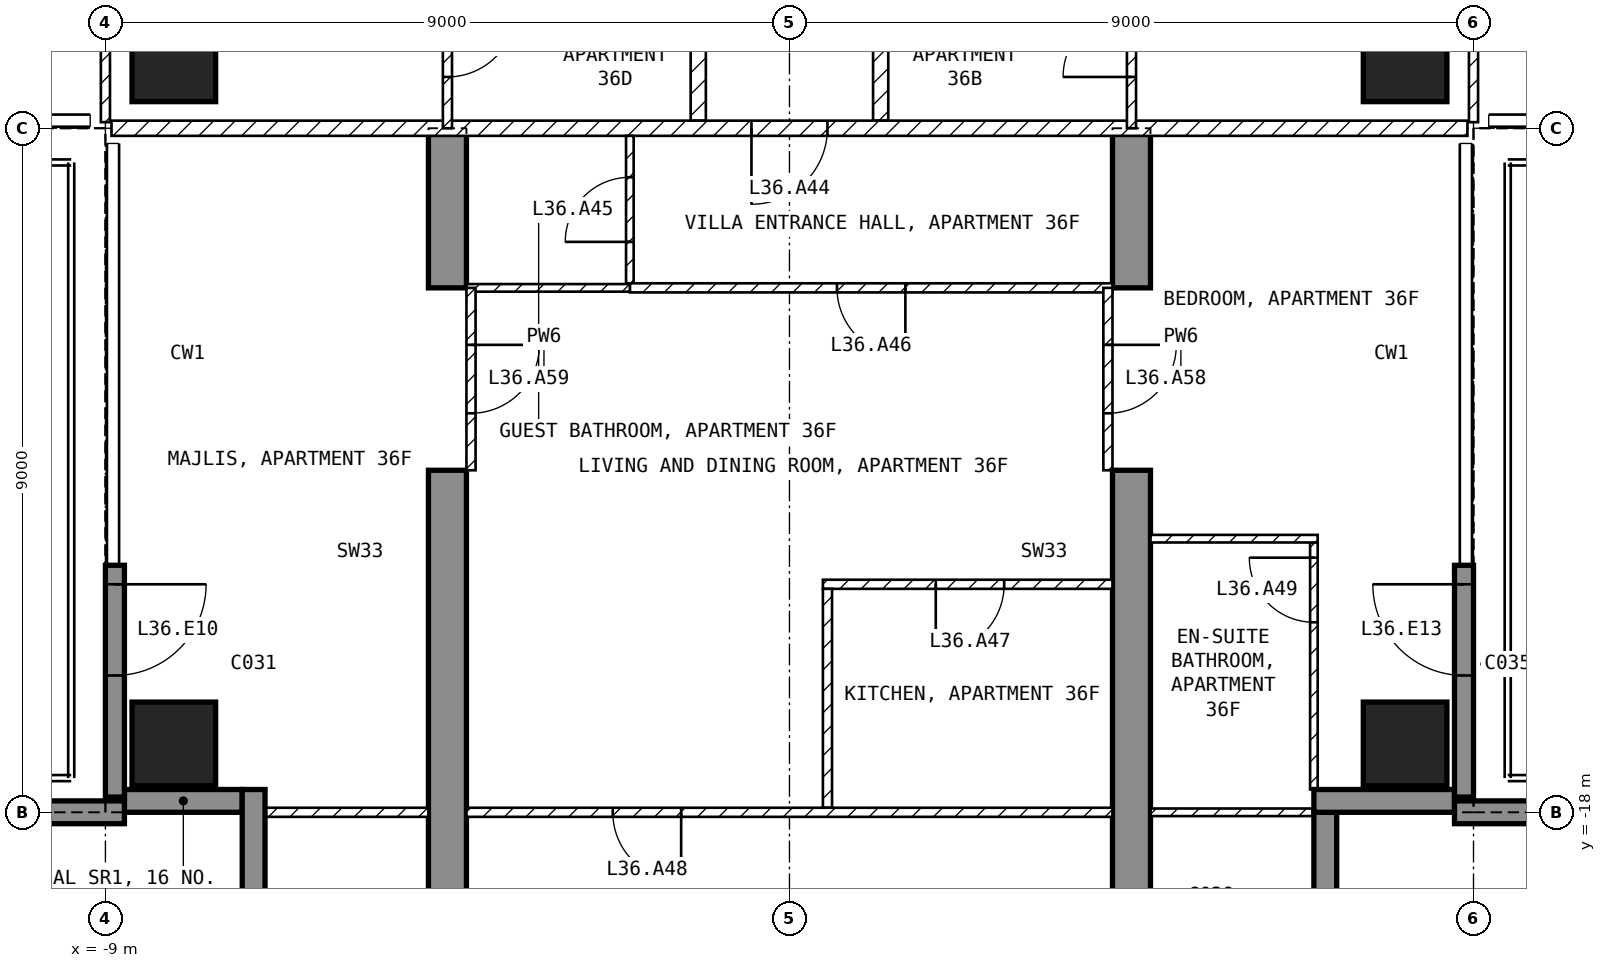
"""IFC4 building model, lengths in metres.
Left out: names, types, materials, properties, quantities, classifications, styles, units other than length and angle.
Written with IfcOpenShell. Run it as: python <this file> out.ifc"""

import sys

from ifc_helpers import new_model, si_unit, direction, frame, frame_2d, origin, origin_2d, place, context, subcontext, project, spatial, polyline, rectangle, outline, extrude, element, fill, save


model = new_model("IFC4")
c1 = context("Model", 3, precision=1e-05, world=origin(), true_north=direction((0.0, 1.0)))
c2 = subcontext(c1, "Body", "Model", "MODEL_VIEW")
j1 = project(units=[si_unit("LENGTHUNIT", "METRE"), si_unit("PLANEANGLEUNIT", "RADIAN")], contexts=[c1])
p1 = place(None, origin())
s1 = spatial("IfcSite", under=j1, at=p1, CompositionType="ELEMENT")
p2 = place(p1, origin())
s2 = spatial("IfcBuilding", under=s1, at=p2, CompositionType="ELEMENT")
p3 = place(p2, frame((0.0, 0.0, 147.9)))
s3 = spatial("IfcBuildingStorey", under=s2, at=p3, CompositionType="ELEMENT", Elevation=147.9)
for number, where, z_axis, x_axis in (
    (1, (-8.1, -17.1, -0.25), (0.0, 0.0, 1.0), (1.0, 0.0, 0.0)),
    (2, (-8.1, -8.1, -0.25), (0.0, 0.0, 1.0), (1.0, 0.0, 0.0)),
    (3, (8.1, -17.1, -0.25), (0.0, 0.0, 1.0), (1.0, 0.0, 0.0)),
    (4, (8.1, -8.1, -0.25), (0.0, 0.0, 1.0), (1.0, 0.0, 0.0)),
):
    element("IfcColumn", number, at=place(p3, frame(where, z_axis=z_axis, x_axis=x_axis)), inside=s3, PredefinedType="COLUMN", context=c2, shape_type="SweptSolid", body=[
        extrude(rectangle(XDim=1.1, YDim=1.1, at=origin_2d()), origin(), (0.0, 0.0, 1.0), 3.5),
    ])
for number, where, z_axis, x_axis in (
    (5, (-4.75, -20.15, -0.25), (1.0, 0.0, 0.0), (0.0, 1.0, 0.0)),
    (6, (4.25, -20.15, -0.25), (1.0, 0.0, 0.0), (0.0, 1.0, 0.0)),
):
    element("IfcWall", number, at=place(p3, frame(where, z_axis=z_axis, x_axis=x_axis)), inside=s3, PredefinedType="SHEAR", context=c2, shape_type="SweptSolid", body=[
        extrude(outline(polyline([(0.0, 0.0), (6.65, 0.0), (6.65, 2.65), (9.05, 2.65), (9.05, 0.0), (11.15, 0.0), (11.15, 3.5), (0.0, 3.5), (0.0, 0.0)])), origin(), (0.0, 0.0, 1.0), 0.5),
    ])
p4 = place(p3, frame((-8.875, -14.75, 0.0), z_axis=(0.0, 0.0, 1.0), x_axis=(0.0, -1.0, 0.0)))
e7 = element("IfcWall", 7, at=p4, inside=s3, PredefinedType="SOLIDWALL", context=c2, shape_type="SweptSolid", body=[
    extrude(rectangle(XDim=3.05, YDim=0.25, at=frame_2d((1.525, 0.0))), origin(), (0.0, 0.0, 1.0), 3.25),
])
p5 = place(p4, frame((0.25, 0.0, 0.0)))
e8 = element("IfcOpeningElement", 8, at=p5, cuts=e7, PredefinedType="OPENING", context=c2, shape_type="SweptSolid", body=[
    extrude(rectangle(XDim=1.2, YDim=2.4, at=frame_2d((0.6, 1.2))), frame((0.0, 0.135, 0.0), z_axis=(0.0, -1.0, 0.0), x_axis=(1.0, 0.0, 0.0)), (0.0, 0.0, 1.0), 0.27),
])
p6 = place(p3, frame((8.875, -17.8, 0.0), z_axis=(0.0, 0.0, 1.0), x_axis=(0.0, 1.0, 0.0)))
e9 = element("IfcWall", 9, at=p6, inside=s3, PredefinedType="SOLIDWALL", context=c2, shape_type="SweptSolid", body=[
    extrude(rectangle(XDim=3.05, YDim=0.25, at=frame_2d((1.525, 0.0))), origin(), (0.0, 0.0, 1.0), 3.25),
])
p7 = place(p6, frame((1.6, 0.0, 0.0)))
e10 = element("IfcOpeningElement", 10, at=p7, cuts=e9, PredefinedType="OPENING", context=c2, shape_type="SweptSolid", body=[
    extrude(rectangle(XDim=1.2, YDim=2.4, at=frame_2d((0.6, 1.2))), frame((0.0, 0.135, 0.0), z_axis=(0.0, -1.0, 0.0), x_axis=(1.0, 0.0, 0.0)), (0.0, 0.0, 1.0), 0.27),
])
p8 = place(p3, frame((7.05, -19.8, 0.0), z_axis=(0.0, 0.0, 1.0), x_axis=(0.0, 1.0, 0.0)))
e11 = element("IfcWall", 11, at=p8, inside=s3, PredefinedType="SOLIDWALL", context=c2, shape_type="SweptSolid", body=[
    extrude(rectangle(XDim=1.8, YDim=0.3, at=frame_2d((0.9, 0.0))), origin(), (0.0, 0.0, 1.0), 3.25),
])
p9 = place(p3, frame((6.9, -17.85, 0.0), z_axis=(0.0, 0.0, 1.0), x_axis=(1.0, 0.0, 0.0)))
e12 = element("IfcWall", 12, at=p9, inside=s3, PredefinedType="SOLIDWALL", context=c2, shape_type="SweptSolid", body=[
    extrude(rectangle(XDim=1.85, YDim=0.3, at=frame_2d((0.925, 0.0))), origin(), (0.0, 0.0, 1.0), 3.25),
])
p10 = place(p3, frame((-8.75, -17.85, 0.0), z_axis=(0.0, 0.0, 1.0), x_axis=(1.0, 0.0, 0.0)))
e13 = element("IfcWall", 13, at=p10, inside=s3, PredefinedType="SOLIDWALL", context=c2, shape_type="SweptSolid", body=[
    extrude(rectangle(XDim=1.55, YDim=0.3, at=frame_2d((0.775, 0.0))), origin(), (0.0, 0.0, 1.0), 3.25),
])
p11 = place(p3, frame((-7.05, -17.7, 0.0), z_axis=(0.0, 0.0, 1.0), x_axis=(0.0, -1.0, 0.0)))
e14 = element("IfcWall", 14, at=p11, inside=s3, PredefinedType="SOLIDWALL", context=c2, shape_type="SweptSolid", body=[
    extrude(rectangle(XDim=1.8, YDim=0.3, at=frame_2d((0.9, 0.0))), origin(), (0.0, 0.0, 1.0), 3.25),
])
for number, where, z_axis, x_axis in (
    (15, (-8.75, -18.0, 0.0), (0.0, 0.0, 1.0), (-1.0, 0.0, 0.0)),
    (16, (8.75, -18.0, 0.0), (0.0, 0.0, 1.0), (1.0, 0.0, 0.0)),
):
    element("IfcWall", number, at=place(p3, frame(where, z_axis=z_axis, x_axis=x_axis)), inside=s3, PredefinedType="SOLIDWALL", context=c2, shape_type="SweptSolid", body=[
        extrude(rectangle(XDim=2.99, YDim=0.3, at=frame_2d((1.495, 0.0))), origin(), (0.0, 0.0, 1.0), 3.25),
    ])
for number, where, z_axis, x_axis in (
    (17, (1.2, -4.6, 0.0), (0.0, 0.0, 1.0), (0.0, -1.0, 0.0)),
    (18, (-1.2, -8.9, 0.0), (0.0, 0.0, 1.0), (0.0, 1.0, 0.0)),
):
    element("IfcWall", number, at=place(p3, frame(where, z_axis=z_axis, x_axis=x_axis)), inside=s3, PredefinedType="PARTITIONING", context=c2, shape_type="SweptSolid", body=[
        extrude(rectangle(XDim=4.3, YDim=0.2, at=frame_2d((2.15, 0.0))), origin(), (0.0, 0.0, 1.0), 3.25),
    ])
p12 = place(p3, frame((8.92, -9.0, 0.0), z_axis=(0.0, 0.0, 1.0), x_axis=(-1.0, 0.0, 0.0)))
e19 = element("IfcWall", 19, at=p12, inside=s3, PredefinedType="PARTITIONING", context=c2, shape_type="SweptSolid", body=[
    extrude(rectangle(XDim=17.84, YDim=0.2, at=frame_2d((8.92, 0.0))), origin(), (0.0, 0.0, 1.0), 3.25),
])
p13 = place(p12, frame((8.42, 0.0, 0.0)))
e20 = element("IfcOpeningElement", 20, at=p13, cuts=e19, PredefinedType="OPENING", context=c2, shape_type="SweptSolid", body=[
    extrude(rectangle(XDim=1.0, YDim=2.1, at=frame_2d((0.5, 1.05))), frame((0.0, 0.11, 0.0), z_axis=(0.0, -1.0, 0.0), x_axis=(1.0, 0.0, 0.0)), (0.0, 0.0, 1.0), 0.22),
])
p14 = place(p3, frame((9.0, -8.92, 0.0), z_axis=(0.0, 0.0, 1.0), x_axis=(0.0, 1.0, 0.0)))
e21 = element("IfcWall", 21, at=p14, inside=s3, PredefinedType="PARTITIONING", context=c2, shape_type="SweptSolid", body=[
    extrude(rectangle(XDim=7.62, YDim=0.12, at=frame_2d((3.81, 0.0))), origin(), (0.0, 0.0, 1.0), 3.25),
])
p15 = place(p14, frame((2.52, 0.0, 0.0)))
e22 = element("IfcOpeningElement", 22, at=p15, cuts=e21, PredefinedType="OPENING", context=c2, shape_type="SweptSolid", body=[
    extrude(rectangle(XDim=0.9, YDim=2.1, at=frame_2d((0.45, 1.05))), frame((0.0, 0.07, 0.0), z_axis=(0.0, -1.0, 0.0), x_axis=(1.0, 0.0, 0.0)), (0.0, 0.0, 1.0), 0.14),
])
p16 = place(p3, frame((4.5, -9.0, 0.0), z_axis=(0.0, 0.0, 1.0), x_axis=(0.0, 1.0, 0.0)))
e23 = element("IfcWall", 23, at=p16, inside=s3, PredefinedType="PARTITIONING", context=c2, shape_type="SweptSolid", body=[
    extrude(rectangle(XDim=2.25, YDim=0.12, at=frame_2d((1.125, 0.0))), origin(), (0.0, 0.0, 1.0), 3.25),
])
p17 = place(p16, frame((0.675, 0.0, 0.0)))
e24 = element("IfcOpeningElement", 24, at=p17, cuts=e23, PredefinedType="OPENING", context=c2, shape_type="SweptSolid", body=[
    extrude(rectangle(XDim=0.9, YDim=2.1, at=frame_2d((0.45, 1.05))), frame((0.0, 0.07, 0.0), z_axis=(0.0, -1.0, 0.0), x_axis=(1.0, 0.0, 0.0)), (0.0, 0.0, 1.0), 0.14),
])
p18 = place(p3, frame((-9.0, -1.3, 0.0), z_axis=(0.0, 0.0, 1.0), x_axis=(0.0, -1.0, 0.0)))
e25 = element("IfcWall", 25, at=p18, inside=s3, PredefinedType="PARTITIONING", context=c2, shape_type="SweptSolid", body=[
    extrude(rectangle(XDim=7.62, YDim=0.12, at=frame_2d((3.81, 0.0))), origin(), (0.0, 0.0, 1.0), 3.25),
])
p19 = place(p18, frame((4.2, 0.0, 0.0)))
e26 = element("IfcOpeningElement", 26, at=p19, cuts=e25, PredefinedType="OPENING", context=c2, shape_type="SweptSolid", body=[
    extrude(rectangle(XDim=0.9, YDim=2.1, at=frame_2d((0.45, 1.05))), frame((0.0, 0.07, 0.0), z_axis=(0.0, -1.0, 0.0), x_axis=(1.0, 0.0, 0.0)), (0.0, 0.0, 1.0), 0.14),
])
p20 = place(p3, frame((-4.5, -6.75, 0.0), z_axis=(0.0, 0.0, 1.0), x_axis=(0.0, -1.0, 0.0)))
e27 = element("IfcWall", 27, at=p20, inside=s3, PredefinedType="PARTITIONING", context=c2, shape_type="SweptSolid", body=[
    extrude(rectangle(XDim=2.25, YDim=0.12, at=frame_2d((1.125, 0.0))), origin(), (0.0, 0.0, 1.0), 3.25),
])
p21 = place(p20, frame((0.675, 0.0, 0.0)))
e28 = element("IfcOpeningElement", 28, at=p21, cuts=e27, PredefinedType="OPENING", context=c2, shape_type="SweptSolid", body=[
    extrude(rectangle(XDim=0.9, YDim=2.1, at=frame_2d((0.45, 1.05))), frame((0.0, 0.07, 0.0), z_axis=(0.0, -1.0, 0.0), x_axis=(1.0, 0.0, 0.0)), (0.0, 0.0, 1.0), 0.14),
])
p22 = place(p3, frame((-2.1, -11.04, 0.0), z_axis=(0.0, 0.0, 1.0), x_axis=(0.0, 1.0, 0.0)))
e29 = element("IfcWall", 29, at=p22, inside=s3, PredefinedType="PARTITIONING", context=c2, shape_type="SweptSolid", body=[
    extrude(rectangle(XDim=1.94, YDim=0.1, at=frame_2d((0.97, 0.0))), origin(), (0.0, 0.0, 1.0), 3.25),
])
p23 = place(p22, frame((0.545, 0.0, 0.0)))
e30 = element("IfcOpeningElement", 30, at=p23, cuts=e29, PredefinedType="OPENING", context=c2, shape_type="SweptSolid", body=[
    extrude(rectangle(XDim=0.85, YDim=2.1, at=frame_2d((0.425, 1.05))), frame((0.0, 0.06, 0.0), z_axis=(0.0, -1.0, 0.0), x_axis=(1.0, 0.0, 0.0)), (0.0, 0.0, 1.0), 0.12),
])
p24 = place(p3, frame((4.25, -11.1, 0.0), z_axis=(0.0, 0.0, 1.0), x_axis=(-1.0, 0.0, 0.0)))
e31 = element("IfcWall", 31, at=p24, inside=s3, PredefinedType="PARTITIONING", context=c2, shape_type="SweptSolid", body=[
    extrude(rectangle(XDim=6.35, YDim=0.12, at=frame_2d((3.175, 0.0))), origin(), (0.0, 0.0, 1.0), 3.25),
])
p25 = place(p24, frame((2.725, 0.0, 0.0)))
e32 = element("IfcOpeningElement", 32, at=p25, cuts=e31, PredefinedType="OPENING", context=c2, shape_type="SweptSolid", body=[
    extrude(rectangle(XDim=0.9, YDim=2.1, at=frame_2d((0.45, 1.05))), frame((0.0, 0.07, 0.0), z_axis=(0.0, -1.0, 0.0), x_axis=(1.0, 0.0, 0.0)), (0.0, 0.0, 1.0), 0.14),
])
p26 = place(p3, frame((-2.1, -11.1, 0.0), z_axis=(0.0, 0.0, 1.0), x_axis=(-1.0, 0.0, 0.0)))
e33 = element("IfcWall", 33, at=p26, inside=s3, PredefinedType="PARTITIONING", context=c2, shape_type="SweptSolid", body=[
    extrude(rectangle(XDim=2.15, YDim=0.1, at=frame_2d((1.075, 0.0))), origin(), (0.0, 0.0, 1.0), 3.25),
])
p27 = place(p3, frame((4.25, -15.0, 0.0), z_axis=(0.0, 0.0, 1.0), x_axis=(-1.0, 0.0, 0.0)))
e34 = element("IfcWall", 34, at=p27, inside=s3, PredefinedType="PARTITIONING", context=c2, shape_type="SweptSolid", body=[
    extrude(rectangle(XDim=3.81, YDim=0.12, at=frame_2d((1.905, 0.0))), origin(), (0.0, 0.0, 1.0), 3.25),
])
p28 = place(p27, frame((1.425, 0.0, 0.0)))
e35 = element("IfcOpeningElement", 35, at=p28, cuts=e34, PredefinedType="OPENING", context=c2, shape_type="SweptSolid", body=[
    extrude(rectangle(XDim=0.9, YDim=2.1, at=frame_2d((0.45, 1.05))), frame((0.0, 0.07, 0.0), z_axis=(0.0, -1.0, 0.0), x_axis=(1.0, 0.0, 0.0)), (0.0, 0.0, 1.0), 0.14),
])
p29 = place(p3, frame((0.5, -15.06, 0.0), z_axis=(0.0, 0.0, 1.0), x_axis=(0.0, -1.0, 0.0)))
e36 = element("IfcWall", 36, at=p29, inside=s3, PredefinedType="PARTITIONING", context=c2, shape_type="SweptSolid", body=[
    extrude(rectangle(XDim=2.88, YDim=0.12, at=frame_2d((1.44, 0.0))), origin(), (0.0, 0.0, 1.0), 3.25),
])
p30 = place(p3, frame((4.25, -18.0, 0.0), z_axis=(0.0, 0.0, 1.0), x_axis=(-1.0, 0.0, 0.0)))
e37 = element("IfcWall", 37, at=p30, inside=s3, PredefinedType="PARTITIONING", context=c2, shape_type="SweptSolid", body=[
    extrude(rectangle(XDim=8.5, YDim=0.12, at=frame_2d((4.25, 0.0))), origin(), (0.0, 0.0, 1.0), 3.25),
])
p31 = place(p30, frame((5.675, 0.0, 0.0)))
e38 = element("IfcOpeningElement", 38, at=p31, cuts=e37, PredefinedType="OPENING", context=c2, shape_type="SweptSolid", body=[
    extrude(rectangle(XDim=0.9, YDim=2.1, at=frame_2d((0.45, 1.05))), frame((0.0, 0.07, 0.0), z_axis=(0.0, -1.0, 0.0), x_axis=(1.0, 0.0, 0.0)), (0.0, 0.0, 1.0), 0.14),
])
p32 = place(p3, frame((6.9, -17.7, 0.0), z_axis=(0.0, 0.0, 1.0), x_axis=(0.0, 1.0, 0.0)))
e39 = element("IfcWall", 39, at=p32, inside=s3, PredefinedType="PARTITIONING", context=c2, shape_type="SweptSolid", body=[
    extrude(rectangle(XDim=3.25, YDim=0.1, at=frame_2d((1.625, 0.0))), origin(), (0.0, 0.0, 1.0), 3.25),
])
p33 = place(p32, frame((2.2, 0.0, 0.0)))
e40 = element("IfcOpeningElement", 40, at=p33, cuts=e39, PredefinedType="OPENING", context=c2, shape_type="SweptSolid", body=[
    extrude(rectangle(XDim=0.85, YDim=2.1, at=frame_2d((0.425, 1.05))), frame((0.0, 0.06, 0.0), z_axis=(0.0, -1.0, 0.0), x_axis=(1.0, 0.0, 0.0)), (0.0, 0.0, 1.0), 0.12),
])
p34 = place(p3, frame((6.95, -14.4, 0.0), z_axis=(0.0, 0.0, 1.0), x_axis=(-1.0, 0.0, 0.0)))
e41 = element("IfcWall", 41, at=p34, inside=s3, PredefinedType="PARTITIONING", context=c2, shape_type="SweptSolid", body=[
    extrude(rectangle(XDim=2.2, YDim=0.1, at=frame_2d((1.1, 0.0))), origin(), (0.0, 0.0, 1.0), 3.25),
])
p35 = place(p3, frame((7.12, -18.0, 0.0), z_axis=(0.0, 0.0, 1.0), x_axis=(-1.0, 0.0, 0.0)))
e42 = element("IfcWall", 42, at=p35, inside=s3, PredefinedType="PARTITIONING", context=c2, shape_type="SweptSolid", body=[
    extrude(rectangle(XDim=2.37, YDim=0.1, at=frame_2d((1.185, 0.0))), origin(), (0.0, 0.0, 1.0), 3.25),
])
p36 = place(p3, frame((-4.75, -18.0, 0.0), z_axis=(0.0, 0.0, 1.0), x_axis=(-1.0, 0.0, 0.0)))
e43 = element("IfcWall", 43, at=p36, inside=s3, PredefinedType="PARTITIONING", context=c2, shape_type="SweptSolid", body=[
    extrude(rectangle(XDim=2.37, YDim=0.12, at=frame_2d((1.185, 0.0))), origin(), (0.0, 0.0, 1.0), 3.25),
])
p37 = place(p3, frame((4.19, -11.1, 0.0), z_axis=(0.0, 0.0, 1.0), x_axis=(0.0, -1.0, 0.0)))
e44 = element("IfcWall", 44, at=p37, inside=s3, PredefinedType="PARTITIONING", context=c2, shape_type="SweptSolid", body=[
    extrude(rectangle(XDim=2.4, YDim=0.12, at=frame_2d((1.2, 0.0))), origin(), (0.0, 0.0, 1.0), 2.4),
])
p38 = place(p37, frame((0.75, 0.0, 0.0)))
e45 = element("IfcOpeningElement", 45, at=p38, cuts=e44, PredefinedType="OPENING", context=c2, shape_type="SweptSolid", body=[
    extrude(rectangle(XDim=0.9, YDim=2.1, at=frame_2d((0.45, 1.05))), frame((0.0, 0.07, 0.0), z_axis=(0.0, -1.0, 0.0), x_axis=(1.0, 0.0, 0.0)), (0.0, 0.0, 1.0), 0.14),
])
p39 = place(p3, frame((-4.19, -11.1, 0.0), z_axis=(0.0, 0.0, 1.0), x_axis=(0.0, -1.0, 0.0)))
e46 = element("IfcWall", 46, at=p39, inside=s3, PredefinedType="PARTITIONING", context=c2, shape_type="SweptSolid", body=[
    extrude(rectangle(XDim=2.4, YDim=0.12, at=frame_2d((1.2, 0.0))), origin(), (0.0, 0.0, 1.0), 2.4),
])
p40 = place(p39, frame((0.75, 0.0, 0.0)))
e47 = element("IfcOpeningElement", 47, at=p40, cuts=e46, PredefinedType="OPENING", context=c2, shape_type="SweptSolid", body=[
    extrude(rectangle(XDim=0.9, YDim=2.1, at=frame_2d((0.45, 1.05))), frame((0.0, 0.07, 0.0), z_axis=(0.0, -1.0, 0.0), x_axis=(1.0, 0.0, 0.0)), (0.0, 0.0, 1.0), 0.14),
])
p41 = place(p5, origin())
e48 = element("IfcDoor", 48, at=p41, inside=s3, OperationType="SINGLE_SWING_LEFT", PredefinedType="DOOR", context=c2, shape_type="SweptSolid", body=[
    extrude(rectangle(XDim=1.2, YDim=2.4, at=frame_2d((0.6, 1.2))), frame((0.0, 0.025, 0.0), z_axis=(0.0, -1.0, 0.0), x_axis=(1.0, 0.0, 0.0)), (0.0, 0.0, 1.0), 0.05),
])
fill(e8, e48)
p42 = place(p7, origin())
e49 = element("IfcDoor", 49, at=p42, inside=s3, OperationType="SINGLE_SWING_RIGHT", PredefinedType="DOOR", context=c2, shape_type="SweptSolid", body=[
    extrude(rectangle(XDim=1.2, YDim=2.4, at=frame_2d((0.6, 1.2))), frame((0.0, 0.025, 0.0), z_axis=(0.0, -1.0, 0.0), x_axis=(1.0, 0.0, 0.0)), (0.0, 0.0, 1.0), 0.05),
])
fill(e10, e49)
p43 = place(p17, origin())
e50 = element("IfcDoor", 50, at=p43, inside=s3, OperationType="SINGLE_SWING_LEFT", PredefinedType="DOOR", context=c2, shape_type="SweptSolid", body=[
    extrude(rectangle(XDim=0.9, YDim=2.1, at=frame_2d((0.45, 1.05))), frame((0.0, 0.025, 0.0), z_axis=(0.0, -1.0, 0.0), x_axis=(1.0, 0.0, 0.0)), (0.0, 0.0, 1.0), 0.05),
])
fill(e24, e50)
p44 = place(p21, origin())
e51 = element("IfcDoor", 51, at=p44, inside=s3, OperationType="SINGLE_SWING_LEFT", PredefinedType="DOOR", context=c2, shape_type="SweptSolid", body=[
    extrude(rectangle(XDim=0.9, YDim=2.1, at=frame_2d((0.45, 1.05))), frame((0.0, 0.025, 0.0), z_axis=(0.0, -1.0, 0.0), x_axis=(1.0, 0.0, 0.0)), (0.0, 0.0, 1.0), 0.05),
])
fill(e28, e51)
p45 = place(p13, origin())
e52 = element("IfcDoor", 52, at=p45, inside=s3, OperationType="SINGLE_SWING_RIGHT", PredefinedType="DOOR", context=c2, shape_type="SweptSolid", body=[
    extrude(rectangle(XDim=1.0, YDim=2.1, at=frame_2d((0.5, 1.05))), frame((0.0, 0.025, 0.0), z_axis=(0.0, -1.0, 0.0), x_axis=(1.0, 0.0, 0.0)), (0.0, 0.0, 1.0), 0.05),
])
fill(e20, e52)
p46 = place(p23, origin())
e53 = element("IfcDoor", 53, at=p46, inside=s3, OperationType="SINGLE_SWING_LEFT", PredefinedType="DOOR", context=c2, shape_type="SweptSolid", body=[
    extrude(rectangle(XDim=0.85, YDim=2.1, at=frame_2d((0.425, 1.05))), frame((0.0, 0.025, 0.0), z_axis=(0.0, -1.0, 0.0), x_axis=(1.0, 0.0, 0.0)), (0.0, 0.0, 1.0), 0.05),
])
fill(e30, e53)
p47 = place(p25, origin())
e54 = element("IfcDoor", 54, at=p47, inside=s3, OperationType="SINGLE_SWING_LEFT", PredefinedType="DOOR", context=c2, shape_type="SweptSolid", body=[
    extrude(rectangle(XDim=0.9, YDim=2.1, at=frame_2d((0.45, 1.05))), frame((0.0, 0.025, 0.0), z_axis=(0.0, -1.0, 0.0), x_axis=(1.0, 0.0, 0.0)), (0.0, 0.0, 1.0), 0.05),
])
fill(e32, e54)
p48 = place(p28, origin())
e55 = element("IfcDoor", 55, at=p48, inside=s3, OperationType="SINGLE_SWING_RIGHT", PredefinedType="DOOR", context=c2, shape_type="SweptSolid", body=[
    extrude(rectangle(XDim=0.9, YDim=2.1, at=frame_2d((0.45, 1.05))), frame((0.0, 0.025, 0.0), z_axis=(0.0, -1.0, 0.0), x_axis=(1.0, 0.0, 0.0)), (0.0, 0.0, 1.0), 0.05),
])
fill(e35, e55)
p49 = place(p31, origin())
e56 = element("IfcDoor", 56, at=p49, inside=s3, OperationType="SINGLE_SWING_LEFT", PredefinedType="DOOR", context=c2, shape_type="SweptSolid", body=[
    extrude(rectangle(XDim=0.9, YDim=2.1, at=frame_2d((0.45, 1.05))), frame((0.0, 0.025, 0.0), z_axis=(0.0, -1.0, 0.0), x_axis=(1.0, 0.0, 0.0)), (0.0, 0.0, 1.0), 0.05),
])
fill(e38, e56)
p50 = place(p33, origin())
e57 = element("IfcDoor", 57, at=p50, inside=s3, OperationType="SINGLE_SWING_RIGHT", PredefinedType="DOOR", context=c2, shape_type="SweptSolid", body=[
    extrude(rectangle(XDim=0.85, YDim=2.1, at=frame_2d((0.425, 1.05))), frame((0.0, 0.025, 0.0), z_axis=(0.0, -1.0, 0.0), x_axis=(1.0, 0.0, 0.0)), (0.0, 0.0, 1.0), 0.05),
])
fill(e40, e57)
p51 = place(p38, origin())
e58 = element("IfcDoor", 58, at=p51, inside=s3, OperationType="SINGLE_SWING_LEFT", PredefinedType="DOOR", context=c2, shape_type="SweptSolid", body=[
    extrude(rectangle(XDim=0.9, YDim=2.1, at=frame_2d((0.45, 1.05))), frame((0.0, 0.025, 0.0), z_axis=(0.0, -1.0, 0.0), x_axis=(1.0, 0.0, 0.0)), (0.0, 0.0, 1.0), 0.05),
])
fill(e45, e58)
p52 = place(p40, origin())
e59 = element("IfcDoor", 59, at=p52, inside=s3, OperationType="SINGLE_SWING_LEFT", PredefinedType="DOOR", context=c2, shape_type="SweptSolid", body=[
    extrude(rectangle(XDim=0.9, YDim=2.1, at=frame_2d((0.45, 1.05))), frame((0.0, 0.025, 0.0), z_axis=(0.0, -1.0, 0.0), x_axis=(1.0, 0.0, 0.0)), (0.0, 0.0, 1.0), 0.05),
])
fill(e47, e59)
save(model, sys.argv[1])
